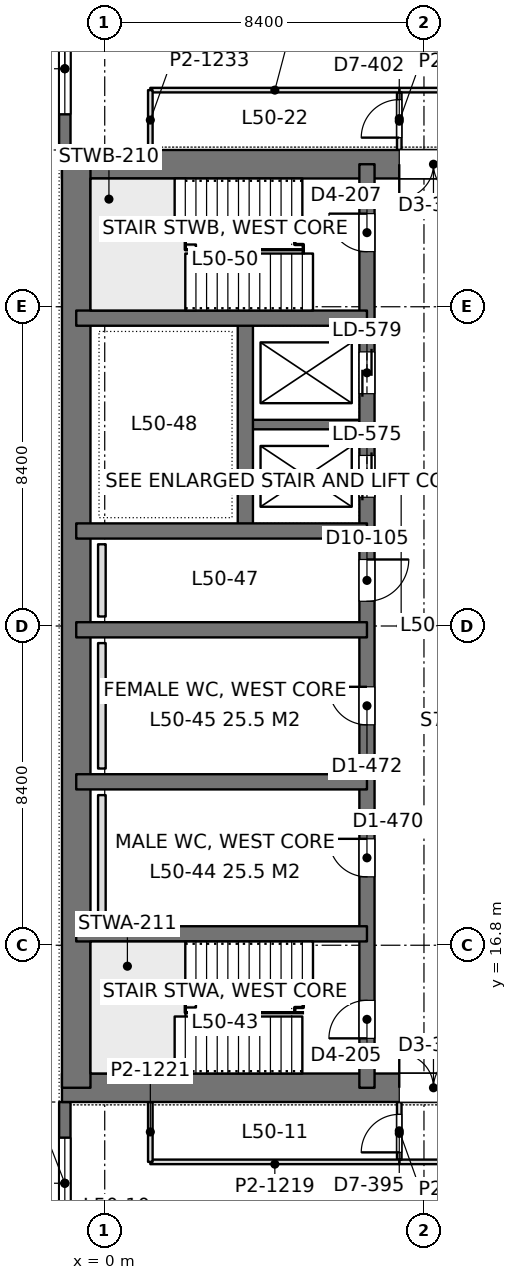
"""IFC4 building model, lengths in metres.
Left out: names, types, materials, properties, quantities, classifications, styles, units other than length and angle.
Written with IfcOpenShell. Run it as: python <this file> out.ifc"""

import sys

from ifc_helpers import new_model, si_unit, direction, frame, frame_2d, origin, place, context, subcontext, project, spatial, rectangle, extrude, element, fill, save


model = new_model("IFC4")
c1 = context("Model", 3, precision=1e-05, world=origin(), true_north=direction((0.0, 1.0)))
c2 = subcontext(c1, "Body", "Model", "MODEL_VIEW")
j1 = project(units=[si_unit("LENGTHUNIT", "METRE"), si_unit("PLANEANGLEUNIT", "RADIAN")], contexts=[c1])
p1 = place(None, origin())
s1 = spatial("IfcSite", under=j1, at=p1, CompositionType="ELEMENT")
p2 = place(p1, origin())
s2 = spatial("IfcBuilding", under=s1, at=p2, CompositionType="ELEMENT")
p3 = place(p2, frame((0.0, 0.0, 219.6)))
s3 = spatial("IfcBuildingStorey", under=s2, at=p3, CompositionType="ELEMENT", Elevation=219.6)
p4 = place(p3, frame((-1.125, 13.05, 0.0), z_axis=(0.0, 0.0, 1.0), x_axis=(1.0, 0.0, 0.0)))
e1 = element("IfcWall", 1, at=p4, inside=s3, PredefinedType="SHEAR", context=c2, shape_type="SweptSolid", body=[
    extrude(rectangle(XDim=17.85, YDim=0.75, at=frame_2d((8.925, 0.0))), origin(), (0.0, 0.0, 1.0), 4.2),
])
p5 = place(p4, frame((8.875, 0.0, 0.0)))
e2 = element("IfcOpeningElement", 2, at=p5, cuts=e1, PredefinedType="OPENING", context=c2, shape_type="SweptSolid", body=[
    extrude(rectangle(XDim=1.8, YDim=2.4, at=frame_2d((0.9, 1.2))), frame((0.0, 0.385, 0.0), z_axis=(0.0, -1.0, 0.0), x_axis=(1.0, 0.0, 0.0)), (0.0, 0.0, 1.0), 0.77),
])
p6 = place(p3, frame((-1.125, 37.35, 0.0), z_axis=(0.0, 0.0, 1.0), x_axis=(1.0, 0.0, 0.0)))
e3 = element("IfcWall", 3, at=p6, inside=s3, PredefinedType="SHEAR", context=c2, shape_type="SweptSolid", body=[
    extrude(rectangle(XDim=17.85, YDim=0.75, at=frame_2d((8.925, 0.0))), origin(), (0.0, 0.0, 1.0), 4.2),
])
p7 = place(p6, frame((8.875, 0.0, 0.0)))
e4 = element("IfcOpeningElement", 4, at=p7, cuts=e3, PredefinedType="OPENING", context=c2, shape_type="SweptSolid", body=[
    extrude(rectangle(XDim=1.8, YDim=2.4, at=frame_2d((0.9, 1.2))), frame((0.0, 0.385, 0.0), z_axis=(0.0, -1.0, 0.0), x_axis=(1.0, 0.0, 0.0)), (0.0, 0.0, 1.0), 0.77),
])
p8 = place(p3, frame((-0.75, 13.05, 0.0), z_axis=(0.0, 0.0, 1.0), x_axis=(0.0, 1.0, 0.0)))
e5 = element("IfcWall", 5, at=p8, inside=s3, PredefinedType="SHEAR", context=c2, shape_type="SweptSolid", body=[
    extrude(rectangle(XDim=24.3, YDim=0.75, at=frame_2d((12.15, 0.0))), origin(), (0.0, 0.0, 1.0), 4.2),
])
p9 = place(p3, frame((6.9, 13.05, 0.0), z_axis=(0.0, 0.0, 1.0), x_axis=(0.0, 1.0, 0.0)))
e6 = element("IfcWall", 6, at=p9, inside=s3, PredefinedType="SHEAR", context=c2, shape_type="SweptSolid", body=[
    extrude(rectangle(XDim=24.3, YDim=0.4, at=frame_2d((12.15, 0.0))), origin(), (0.0, 0.0, 1.0), 4.2),
])
p10 = place(p9, frame((1.3, 0.0, 0.0)))
e7 = element("IfcOpeningElement", 7, at=p10, cuts=e6, PredefinedType="OPENING", context=c2, shape_type="SweptSolid", body=[
    extrude(rectangle(XDim=1.0, YDim=2.2, at=frame_2d((0.5, 1.1))), frame((0.0, 0.21, 0.0), z_axis=(0.0, -1.0, 0.0), x_axis=(1.0, 0.0, 0.0)), (0.0, 0.0, 1.0), 0.42),
])
p11 = place(p9, frame((22.0, 0.0, 0.0)))
e8 = element("IfcOpeningElement", 8, at=p11, cuts=e6, PredefinedType="OPENING", context=c2, shape_type="SweptSolid", body=[
    extrude(rectangle(XDim=1.0, YDim=2.2, at=frame_2d((0.5, 1.1))), frame((0.0, 0.21, 0.0), z_axis=(0.0, -1.0, 0.0), x_axis=(1.0, 0.0, 0.0)), (0.0, 0.0, 1.0), 0.42),
])
p12 = place(p9, frame((5.55, 0.0, 0.0)))
e9 = element("IfcOpeningElement", 9, at=p12, cuts=e6, PredefinedType="OPENING", context=c2, shape_type="SweptSolid", body=[
    extrude(rectangle(XDim=1.0, YDim=2.2, at=frame_2d((0.5, 1.1))), frame((0.0, 0.21, 0.0), z_axis=(0.0, -1.0, 0.0), x_axis=(1.0, 0.0, 0.0)), (0.0, 0.0, 1.0), 0.42),
])
p13 = place(p9, frame((9.55, 0.0, 0.0)))
e10 = element("IfcOpeningElement", 10, at=p13, cuts=e6, PredefinedType="OPENING", context=c2, shape_type="SweptSolid", body=[
    extrude(rectangle(XDim=1.0, YDim=2.2, at=frame_2d((0.5, 1.1))), frame((0.0, 0.21, 0.0), z_axis=(0.0, -1.0, 0.0), x_axis=(1.0, 0.0, 0.0)), (0.0, 0.0, 1.0), 0.42),
])
p14 = place(p9, frame((12.8, 0.0, 0.0)))
e11 = element("IfcOpeningElement", 11, at=p14, cuts=e6, PredefinedType="OPENING", context=c2, shape_type="SweptSolid", body=[
    extrude(rectangle(XDim=1.1, YDim=2.2, at=frame_2d((0.55, 1.1))), frame((0.0, 0.21, 0.0), z_axis=(0.0, -1.0, 0.0), x_axis=(1.0, 0.0, 0.0)), (0.0, 0.0, 1.0), 0.42),
])
p15 = place(p9, frame((15.538, 0.0, 0.0)))
e12 = element("IfcOpeningElement", 12, at=p15, cuts=e6, PredefinedType="OPENING", context=c2, shape_type="SweptSolid", body=[
    extrude(rectangle(XDim=1.1, YDim=2.2, at=frame_2d((0.55, 1.1))), frame((0.0, 0.21, 0.0), z_axis=(0.0, -1.0, 0.0), x_axis=(1.0, 0.0, 0.0)), (0.0, 0.0, 1.0), 0.42),
])
p16 = place(p9, frame((18.262, 0.0, 0.0)))
e13 = element("IfcOpeningElement", 13, at=p16, cuts=e6, PredefinedType="OPENING", context=c2, shape_type="SweptSolid", body=[
    extrude(rectangle(XDim=1.1, YDim=2.2, at=frame_2d((0.55, 1.1))), frame((0.0, 0.21, 0.0), z_axis=(0.0, -1.0, 0.0), x_axis=(1.0, 0.0, 0.0)), (0.0, 0.0, 1.0), 0.42),
])
for number, where, z_axis, x_axis in (
    (14, (-0.75, 17.1, 0.0), (0.0, 0.0, 1.0), (1.0, 0.0, 0.0)),
    (15, (-0.75, 21.1, 0.0), (0.0, 0.0, 1.0), (1.0, 0.0, 0.0)),
    (16, (-0.75, 25.1, 0.0), (0.0, 0.0, 1.0), (1.0, 0.0, 0.0)),
    (17, (-0.75, 27.7, 0.0), (0.0, 0.0, 1.0), (1.0, 0.0, 0.0)),
    (18, (-0.75, 33.3, 0.0), (0.0, 0.0, 1.0), (1.0, 0.0, 0.0)),
):
    element("IfcWall", number, at=place(p3, frame(where, z_axis=z_axis, x_axis=x_axis)), inside=s3, PredefinedType="SHEAR", context=c2, shape_type="SweptSolid", body=[
        extrude(rectangle(XDim=7.65, YDim=0.4, at=frame_2d((3.825, 0.0))), origin(), (0.0, 0.0, 1.0), 4.2),
    ])
p17 = place(p3, frame((3.7, 27.7, 0.0), z_axis=(0.0, 0.0, 1.0), x_axis=(0.0, 1.0, 0.0)))
e19 = element("IfcWall", 19, at=p17, inside=s3, PredefinedType="SHEAR", context=c2, shape_type="SweptSolid", body=[
    extrude(rectangle(XDim=5.6, YDim=0.4, at=frame_2d((2.8, 0.0))), origin(), (0.0, 0.0, 1.0), 4.2),
])
p18 = place(p3, frame((3.7, 30.5, 0.0), z_axis=(0.0, 0.0, 1.0), x_axis=(1.0, 0.0, 0.0)))
e20 = element("IfcWall", 20, at=p18, inside=s3, PredefinedType="SHEAR", context=c2, shape_type="SweptSolid", body=[
    extrude(rectangle(XDim=3.2, YDim=0.25, at=frame_2d((1.6, 0.0))), origin(), (0.0, 0.0, 1.0), 4.2),
])
p19 = place(p3, frame((-1.05, 8.4, 0.0), z_axis=(0.0, 0.0, 1.0), x_axis=(0.0, 1.0, 0.0)))
e21 = element("IfcWall", 21, at=p19, inside=s3, PredefinedType="SOLIDWALL", context=c2, shape_type="SweptSolid", body=[
    extrude(rectangle(XDim=4.275, YDim=0.3, at=frame_2d((2.138, 0.0))), origin(), (0.0, 0.0, 1.0), 4.05),
])
p20 = place(p19, frame((0.938, 0.0, 0.9)))
e22 = element("IfcOpeningElement", 22, at=p20, cuts=e21, PredefinedType="OPENING", context=c2, shape_type="SweptSolid", body=[
    extrude(rectangle(XDim=2.4, YDim=1.9, at=frame_2d((1.2, 0.95))), frame((0.0, 0.16, 0.0), z_axis=(0.0, -1.0, 0.0), x_axis=(1.0, 0.0, 0.0)), (0.0, 0.0, 1.0), 0.32),
])
p21 = place(p3, frame((-1.05, 37.725, 0.0), z_axis=(0.0, 0.0, 1.0), x_axis=(0.0, 1.0, 0.0)))
e23 = element("IfcWall", 23, at=p21, inside=s3, PredefinedType="SOLIDWALL", context=c2, shape_type="SweptSolid", body=[
    extrude(rectangle(XDim=4.275, YDim=0.3, at=frame_2d((2.137, 0.0))), origin(), (0.0, 0.0, 1.0), 4.05),
])
p22 = place(p21, frame((0.938, 0.0, 0.9)))
e24 = element("IfcOpeningElement", 24, at=p22, cuts=e23, PredefinedType="OPENING", context=c2, shape_type="SweptSolid", body=[
    extrude(rectangle(XDim=2.4, YDim=1.9, at=frame_2d((1.2, 0.95))), frame((0.0, 0.16, 0.0), z_axis=(0.0, -1.0, 0.0), x_axis=(1.0, 0.0, 0.0)), (0.0, 0.0, 1.0), 0.32),
])
p23 = place(p3, frame((7.748, 11.1, 0.0), z_axis=(0.0, 0.0, 1.0), x_axis=(1.0, 0.0, 0.0)))
e25 = element("IfcWall", 25, at=p23, inside=s3, PredefinedType="PARTITIONING", context=c2, shape_type="SweptSolid", body=[
    extrude(rectangle(XDim=41.452, YDim=0.12, at=frame_2d((20.726, 0.0))), origin(), (0.0, 0.0, 1.0), 3.55),
])
p24 = place(p23, frame((2.119, 0.0, 0.0)))
e26 = element("IfcOpeningElement", 26, at=p24, cuts=e25, PredefinedType="OPENING", context=c2, shape_type="SweptSolid", body=[
    extrude(rectangle(XDim=1.8, YDim=2.2, at=frame_2d((0.9, 1.1))), frame((0.0, 0.07, 0.0), z_axis=(0.0, -1.0, 0.0), x_axis=(1.0, 0.0, 0.0)), (0.0, 0.0, 1.0), 0.14),
])
p25 = place(p23, frame((5.135, 0.0, 0.0)))
e27 = element("IfcOpeningElement", 27, at=p25, cuts=e25, PredefinedType="OPENING", context=c2, shape_type="SweptSolid", body=[
    extrude(rectangle(XDim=1.8, YDim=2.2, at=frame_2d((0.9, 1.1))), frame((0.0, 0.07, 0.0), z_axis=(0.0, -1.0, 0.0), x_axis=(1.0, 0.0, 0.0)), (0.0, 0.0, 1.0), 0.14),
])
p26 = place(p23, frame((12.352, 0.0, 0.0)))
e28 = element("IfcOpeningElement", 28, at=p26, cuts=e25, PredefinedType="OPENING", context=c2, shape_type="SweptSolid", body=[
    extrude(rectangle(XDim=1.8, YDim=2.2, at=frame_2d((0.9, 1.1))), frame((0.0, 0.07, 0.0), z_axis=(0.0, -1.0, 0.0), x_axis=(1.0, 0.0, 0.0)), (0.0, 0.0, 1.0), 0.14),
])
p27 = place(p23, frame((20.752, 0.0, 0.0)))
e29 = element("IfcOpeningElement", 29, at=p27, cuts=e25, PredefinedType="OPENING", context=c2, shape_type="SweptSolid", body=[
    extrude(rectangle(XDim=1.8, YDim=2.2, at=frame_2d((0.9, 1.1))), frame((0.0, 0.07, 0.0), z_axis=(0.0, -1.0, 0.0), x_axis=(1.0, 0.0, 0.0)), (0.0, 0.0, 1.0), 0.14),
])
p28 = place(p23, frame((24.952, 0.0, 0.0)))
e30 = element("IfcOpeningElement", 30, at=p28, cuts=e25, PredefinedType="OPENING", context=c2, shape_type="SweptSolid", body=[
    extrude(rectangle(XDim=1.8, YDim=2.2, at=frame_2d((0.9, 1.1))), frame((0.0, 0.07, 0.0), z_axis=(0.0, -1.0, 0.0), x_axis=(1.0, 0.0, 0.0)), (0.0, 0.0, 1.0), 0.14),
])
p29 = place(p23, frame((32.952, 0.0, 0.0)))
e31 = element("IfcOpeningElement", 31, at=p29, cuts=e25, PredefinedType="OPENING", context=c2, shape_type="SweptSolid", body=[
    extrude(rectangle(XDim=1.8, YDim=2.2, at=frame_2d((0.9, 1.1))), frame((0.0, 0.07, 0.0), z_axis=(0.0, -1.0, 0.0), x_axis=(1.0, 0.0, 0.0)), (0.0, 0.0, 1.0), 0.14),
])
p30 = place(p23, frame((36.752, 0.0, 0.0)))
e32 = element("IfcOpeningElement", 32, at=p30, cuts=e25, PredefinedType="OPENING", context=c2, shape_type="SweptSolid", body=[
    extrude(rectangle(XDim=1.8, YDim=2.2, at=frame_2d((0.9, 1.1))), frame((0.0, 0.07, 0.0), z_axis=(0.0, -1.0, 0.0), x_axis=(1.0, 0.0, 0.0)), (0.0, 0.0, 1.0), 0.14),
])
p31 = place(p3, frame((7.75, 11.158, 0.0), z_axis=(0.0, 0.0, 1.0), x_axis=(0.0, 1.0, 0.0)))
e33 = element("IfcWall", 33, at=p31, inside=s3, PredefinedType="PARTITIONING", context=c2, shape_type="SweptSolid", body=[
    extrude(rectangle(XDim=1.518, YDim=0.12, at=frame_2d((0.759, 0.0))), origin(), (0.0, 0.0, 1.0), 4.05),
])
p32 = place(p31, frame((0.192, 0.0, 0.0)))
e34 = element("IfcOpeningElement", 34, at=p32, cuts=e33, PredefinedType="OPENING", context=c2, shape_type="SweptSolid", body=[
    extrude(rectangle(XDim=1.0, YDim=2.4, at=frame_2d((0.5, 1.2))), frame((0.0, 0.07, 0.0), z_axis=(0.0, -1.0, 0.0), x_axis=(1.0, 0.0, 0.0)), (0.0, 0.0, 1.0), 0.14),
])
p33 = place(p3, frame((1.2, 11.1, 0.0), z_axis=(0.0, 0.0, 1.0), x_axis=(1.0, 0.0, 0.0)))
e35 = element("IfcWall", 35, at=p33, inside=s3, PredefinedType="PARTITIONING", context=c2, shape_type="SweptSolid", body=[
    extrude(rectangle(XDim=6.552, YDim=0.12, at=frame_2d((3.276, 0.0))), origin(), (0.0, 0.0, 1.0), 4.05),
])
p34 = place(p3, frame((1.2, 11.1, 0.0), z_axis=(0.0, 0.0, 1.0), x_axis=(0.0, 1.0, 0.0)))
e36 = element("IfcWall", 36, at=p34, inside=s3, PredefinedType="PARTITIONING", context=c2, shape_type="SweptSolid", body=[
    extrude(rectangle(XDim=1.576, YDim=0.12, at=frame_2d((0.788, 0.0))), origin(), (0.0, 0.0, 1.0), 4.05),
])
p35 = place(p3, frame((7.748, 39.3, 0.0), z_axis=(0.0, 0.0, 1.0), x_axis=(1.0, 0.0, 0.0)))
e37 = element("IfcWall", 37, at=p35, inside=s3, PredefinedType="PARTITIONING", context=c2, shape_type="SweptSolid", body=[
    extrude(rectangle(XDim=41.452, YDim=0.12, at=frame_2d((20.726, 0.0))), origin(), (0.0, 0.0, 1.0), 3.55),
])
p36 = place(p35, frame((1.527, 0.0, 0.0)))
e38 = element("IfcOpeningElement", 38, at=p36, cuts=e37, PredefinedType="OPENING", context=c2, shape_type="SweptSolid", body=[
    extrude(rectangle(XDim=1.8, YDim=2.2, at=frame_2d((0.9, 1.1))), frame((0.0, 0.07, 0.0), z_axis=(0.0, -1.0, 0.0), x_axis=(1.0, 0.0, 0.0)), (0.0, 0.0, 1.0), 0.14),
])
p37 = place(p35, frame((8.152, 0.0, 0.0)))
e39 = element("IfcOpeningElement", 39, at=p37, cuts=e37, PredefinedType="OPENING", context=c2, shape_type="SweptSolid", body=[
    extrude(rectangle(XDim=1.8, YDim=2.2, at=frame_2d((0.9, 1.1))), frame((0.0, 0.07, 0.0), z_axis=(0.0, -1.0, 0.0), x_axis=(1.0, 0.0, 0.0)), (0.0, 0.0, 1.0), 0.14),
])
p38 = place(p35, frame((12.352, 0.0, 0.0)))
e40 = element("IfcOpeningElement", 40, at=p38, cuts=e37, PredefinedType="OPENING", context=c2, shape_type="SweptSolid", body=[
    extrude(rectangle(XDim=1.8, YDim=2.2, at=frame_2d((0.9, 1.1))), frame((0.0, 0.07, 0.0), z_axis=(0.0, -1.0, 0.0), x_axis=(1.0, 0.0, 0.0)), (0.0, 0.0, 1.0), 0.14),
])
p39 = place(p35, frame((20.752, 0.0, 0.0)))
e41 = element("IfcOpeningElement", 41, at=p39, cuts=e37, PredefinedType="OPENING", context=c2, shape_type="SweptSolid", body=[
    extrude(rectangle(XDim=1.8, YDim=2.2, at=frame_2d((0.9, 1.1))), frame((0.0, 0.07, 0.0), z_axis=(0.0, -1.0, 0.0), x_axis=(1.0, 0.0, 0.0)), (0.0, 0.0, 1.0), 0.14),
])
p40 = place(p35, frame((24.952, 0.0, 0.0)))
e42 = element("IfcOpeningElement", 42, at=p40, cuts=e37, PredefinedType="OPENING", context=c2, shape_type="SweptSolid", body=[
    extrude(rectangle(XDim=1.8, YDim=2.2, at=frame_2d((0.9, 1.1))), frame((0.0, 0.07, 0.0), z_axis=(0.0, -1.0, 0.0), x_axis=(1.0, 0.0, 0.0)), (0.0, 0.0, 1.0), 0.14),
])
p41 = place(p35, frame((32.952, 0.0, 0.0)))
e43 = element("IfcOpeningElement", 43, at=p41, cuts=e37, PredefinedType="OPENING", context=c2, shape_type="SweptSolid", body=[
    extrude(rectangle(XDim=1.8, YDim=2.2, at=frame_2d((0.9, 1.1))), frame((0.0, 0.07, 0.0), z_axis=(0.0, -1.0, 0.0), x_axis=(1.0, 0.0, 0.0)), (0.0, 0.0, 1.0), 0.14),
])
p42 = place(p35, frame((36.752, 0.0, 0.0)))
e44 = element("IfcOpeningElement", 44, at=p42, cuts=e37, PredefinedType="OPENING", context=c2, shape_type="SweptSolid", body=[
    extrude(rectangle(XDim=1.8, YDim=2.2, at=frame_2d((0.9, 1.1))), frame((0.0, 0.07, 0.0), z_axis=(0.0, -1.0, 0.0), x_axis=(1.0, 0.0, 0.0)), (0.0, 0.0, 1.0), 0.14),
])
p43 = place(p3, frame((7.75, 37.724, 0.0), z_axis=(0.0, 0.0, 1.0), x_axis=(0.0, 1.0, 0.0)))
e45 = element("IfcWall", 45, at=p43, inside=s3, PredefinedType="PARTITIONING", context=c2, shape_type="SweptSolid", body=[
    extrude(rectangle(XDim=1.518, YDim=0.12, at=frame_2d((0.759, 0.0))), origin(), (0.0, 0.0, 1.0), 4.05),
])
p44 = place(p43, frame((0.326, 0.0, 0.0)))
e46 = element("IfcOpeningElement", 46, at=p44, cuts=e45, PredefinedType="OPENING", context=c2, shape_type="SweptSolid", body=[
    extrude(rectangle(XDim=1.0, YDim=2.4, at=frame_2d((0.5, 1.2))), frame((0.0, 0.07, 0.0), z_axis=(0.0, -1.0, 0.0), x_axis=(1.0, 0.0, 0.0)), (0.0, 0.0, 1.0), 0.14),
])
p45 = place(p3, frame((1.2, 39.3, 0.0), z_axis=(0.0, 0.0, 1.0), x_axis=(1.0, 0.0, 0.0)))
e47 = element("IfcWall", 47, at=p45, inside=s3, PredefinedType="PARTITIONING", context=c2, shape_type="SweptSolid", body=[
    extrude(rectangle(XDim=6.552, YDim=0.12, at=frame_2d((3.276, 0.0))), origin(), (0.0, 0.0, 1.0), 3.69),
])
p46 = place(p3, frame((1.2, 37.724, 0.0), z_axis=(0.0, 0.0, 1.0), x_axis=(0.0, 1.0, 0.0)))
e48 = element("IfcWall", 48, at=p46, inside=s3, PredefinedType="PARTITIONING", context=c2, shape_type="SweptSolid", body=[
    extrude(rectangle(XDim=1.576, YDim=0.12, at=frame_2d((0.788, 0.0))), origin(), (0.0, 0.0, 1.0), 4.05),
])
for number, where, z_axis, x_axis in (
    (49, (-0.075, 17.45, 0.0), (0.0, 0.0, 1.0), (0.0, 1.0, 0.0)),
    (50, (-0.075, 21.45, 0.0), (0.0, 0.0, 1.0), (0.0, 1.0, 0.0)),
):
    element("IfcWall", number, at=place(p3, frame(where, z_axis=z_axis, x_axis=x_axis)), inside=s3, PredefinedType="PLUMBINGWALL", context=c2, shape_type="SweptSolid", body=[
        extrude(rectangle(XDim=3.3, YDim=0.2, at=frame_2d((1.65, 0.0))), origin(), (0.0, 0.0, 1.0), 1.2),
    ])
p47 = place(p3, frame((-0.075, 25.45, 0.0), z_axis=(0.0, 0.0, 1.0), x_axis=(0.0, 1.0, 0.0)))
e51 = element("IfcWall", 51, at=p47, inside=s3, PredefinedType="PLUMBINGWALL", context=c2, shape_type="SweptSolid", body=[
    extrude(rectangle(XDim=1.9, YDim=0.2, at=frame_2d((0.95, 0.0))), origin(), (0.0, 0.0, 1.0), 1.2),
])
p48 = place(p20, origin())
e52 = element("IfcWindow", 52, at=p48, inside=s3, PartitioningType="SINGLE_PANEL", PredefinedType="WINDOW", context=c2, shape_type="SweptSolid", body=[
    extrude(rectangle(XDim=2.4, YDim=1.9, at=frame_2d((1.2, 0.95))), frame((0.0, 0.03, 0.0), z_axis=(0.0, -1.0, 0.0), x_axis=(1.0, 0.0, 0.0)), (0.0, 0.0, 1.0), 0.06),
])
fill(e22, e52)
p49 = place(p22, origin())
e53 = element("IfcWindow", 53, at=p49, inside=s3, PartitioningType="SINGLE_PANEL", PredefinedType="WINDOW", context=c2, shape_type="SweptSolid", body=[
    extrude(rectangle(XDim=2.4, YDim=1.9, at=frame_2d((1.2, 0.95))), frame((0.0, 0.03, 0.0), z_axis=(0.0, -1.0, 0.0), x_axis=(1.0, 0.0, 0.0)), (0.0, 0.0, 1.0), 0.06),
])
fill(e24, e53)
p50 = place(p5, origin())
e54 = element("IfcDoor", 54, at=p50, inside=s3, OperationType="DOUBLE_DOOR_SINGLE_SWING", PredefinedType="DOOR", context=c2, shape_type="SweptSolid", body=[
    extrude(rectangle(XDim=1.8, YDim=2.4, at=frame_2d((0.9, 1.2))), frame((0.0, 0.025, 0.0), z_axis=(0.0, -1.0, 0.0), x_axis=(1.0, 0.0, 0.0)), (0.0, 0.0, 1.0), 0.05),
])
fill(e2, e54)
p51 = place(p7, frame((1.8, 0.0, 0.0), z_axis=(0.0, 0.0, 1.0), x_axis=(-1.0, 0.0, 0.0)))
e55 = element("IfcDoor", 55, at=p51, inside=s3, OperationType="DOUBLE_DOOR_SINGLE_SWING", PredefinedType="DOOR", context=c2, shape_type="SweptSolid", body=[
    extrude(rectangle(XDim=1.8, YDim=2.4, at=frame_2d((0.9, 1.2))), frame((0.0, 0.025, 0.0), z_axis=(0.0, -1.0, 0.0), x_axis=(1.0, 0.0, 0.0)), (0.0, 0.0, 1.0), 0.05),
])
fill(e4, e55)
p52 = place(p10, origin())
e56 = element("IfcDoor", 56, at=p52, inside=s3, OperationType="SINGLE_SWING_LEFT", PredefinedType="DOOR", context=c2, shape_type="SweptSolid", body=[
    extrude(rectangle(XDim=1.0, YDim=2.2, at=frame_2d((0.5, 1.1))), frame((0.0, 0.025, 0.0), z_axis=(0.0, -1.0, 0.0), x_axis=(1.0, 0.0, 0.0)), (0.0, 0.0, 1.0), 0.05),
])
fill(e7, e56)
p53 = place(p11, origin())
e57 = element("IfcDoor", 57, at=p53, inside=s3, OperationType="SINGLE_SWING_RIGHT", PredefinedType="DOOR", context=c2, shape_type="SweptSolid", body=[
    extrude(rectangle(XDim=1.0, YDim=2.2, at=frame_2d((0.5, 1.1))), frame((0.0, 0.025, 0.0), z_axis=(0.0, -1.0, 0.0), x_axis=(1.0, 0.0, 0.0)), (0.0, 0.0, 1.0), 0.05),
])
fill(e8, e57)
p54 = place(p12, origin())
e58 = element("IfcDoor", 58, at=p54, inside=s3, OperationType="SINGLE_SWING_RIGHT", PredefinedType="DOOR", context=c2, shape_type="SweptSolid", body=[
    extrude(rectangle(XDim=1.0, YDim=2.2, at=frame_2d((0.5, 1.1))), frame((0.0, 0.025, 0.0), z_axis=(0.0, -1.0, 0.0), x_axis=(1.0, 0.0, 0.0)), (0.0, 0.0, 1.0), 0.05),
])
fill(e9, e58)
p55 = place(p13, origin())
e59 = element("IfcDoor", 59, at=p55, inside=s3, OperationType="SINGLE_SWING_RIGHT", PredefinedType="DOOR", context=c2, shape_type="SweptSolid", body=[
    extrude(rectangle(XDim=1.0, YDim=2.2, at=frame_2d((0.5, 1.1))), frame((0.0, 0.025, 0.0), z_axis=(0.0, -1.0, 0.0), x_axis=(1.0, 0.0, 0.0)), (0.0, 0.0, 1.0), 0.05),
])
fill(e10, e59)
p56 = place(p14, frame((1.1, 0.0, 0.0), z_axis=(0.0, 0.0, 1.0), x_axis=(-1.0, 0.0, 0.0)))
e60 = element("IfcDoor", 60, at=p56, inside=s3, OperationType="SINGLE_SWING_LEFT", PredefinedType="DOOR", context=c2, shape_type="SweptSolid", body=[
    extrude(rectangle(XDim=1.1, YDim=2.2, at=frame_2d((0.55, 1.1))), frame((0.0, 0.025, 0.0), z_axis=(0.0, -1.0, 0.0), x_axis=(1.0, 0.0, 0.0)), (0.0, 0.0, 1.0), 0.05),
])
fill(e11, e60)
p57 = place(p15, origin())
e61 = element("IfcDoor", 61, at=p57, inside=s3, OperationType="DOUBLE_DOOR_SLIDING", PredefinedType="DOOR", context=c2, shape_type="SweptSolid", body=[
    extrude(rectangle(XDim=1.1, YDim=2.2, at=frame_2d((0.55, 1.1))), frame((0.0, 0.025, 0.0), z_axis=(0.0, -1.0, 0.0), x_axis=(1.0, 0.0, 0.0)), (0.0, 0.0, 1.0), 0.05),
])
fill(e12, e61)
p58 = place(p16, origin())
e62 = element("IfcDoor", 62, at=p58, inside=s3, OperationType="DOUBLE_DOOR_SLIDING", PredefinedType="DOOR", context=c2, shape_type="SweptSolid", body=[
    extrude(rectangle(XDim=1.1, YDim=2.2, at=frame_2d((0.55, 1.1))), frame((0.0, 0.025, 0.0), z_axis=(0.0, -1.0, 0.0), x_axis=(1.0, 0.0, 0.0)), (0.0, 0.0, 1.0), 0.05),
])
fill(e13, e62)
p59 = place(p32, origin())
e63 = element("IfcDoor", 63, at=p59, inside=s3, OperationType="SINGLE_SWING_LEFT", PredefinedType="DOOR", context=c2, shape_type="SweptSolid", body=[
    extrude(rectangle(XDim=1.0, YDim=2.4, at=frame_2d((0.5, 1.2))), frame((0.0, 0.025, 0.0), z_axis=(0.0, -1.0, 0.0), x_axis=(1.0, 0.0, 0.0)), (0.0, 0.0, 1.0), 0.05),
])
fill(e34, e63)
p60 = place(p44, origin())
e64 = element("IfcDoor", 64, at=p60, inside=s3, OperationType="SINGLE_SWING_LEFT", PredefinedType="DOOR", context=c2, shape_type="SweptSolid", body=[
    extrude(rectangle(XDim=1.0, YDim=2.4, at=frame_2d((0.5, 1.2))), frame((0.0, 0.025, 0.0), z_axis=(0.0, -1.0, 0.0), x_axis=(1.0, 0.0, 0.0)), (0.0, 0.0, 1.0), 0.05),
])
fill(e46, e64)
save(model, sys.argv[1])
